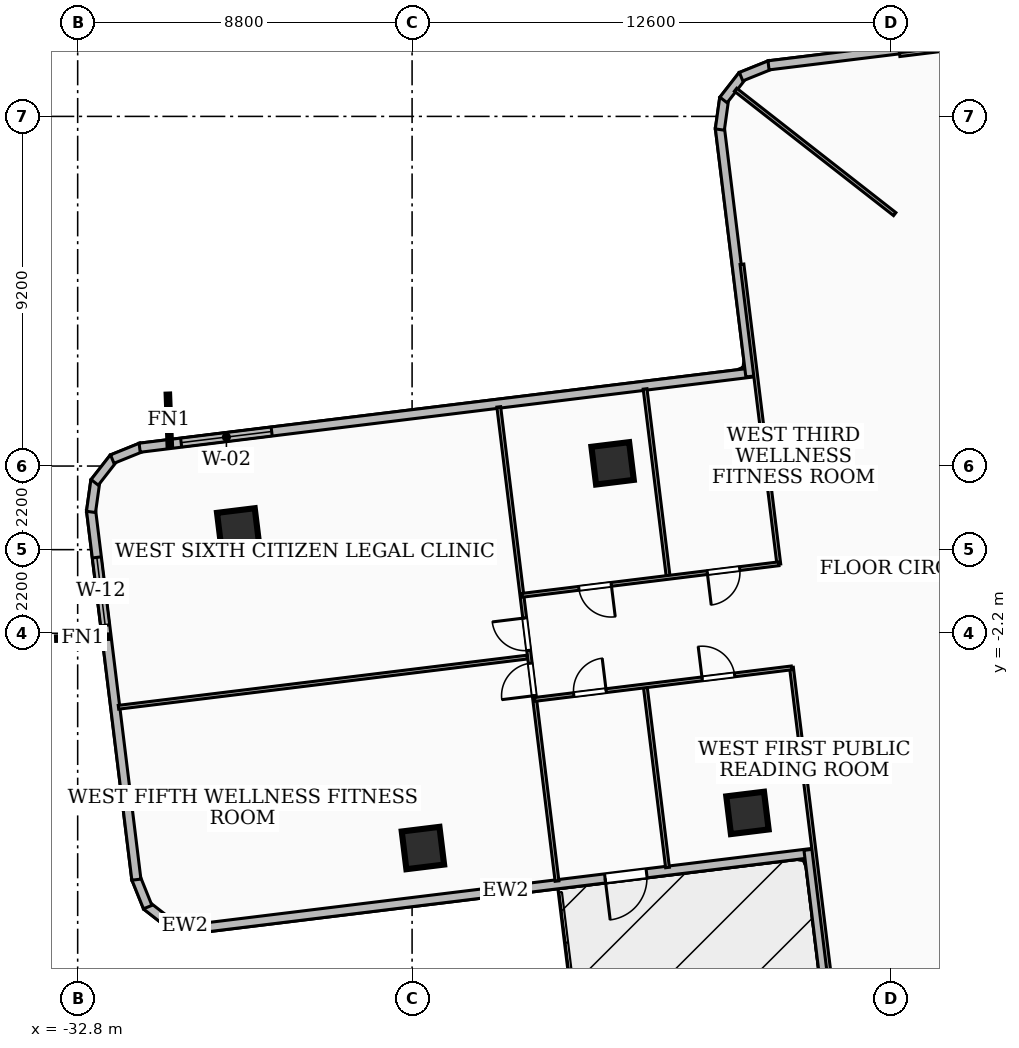
"""IFC4 building model, lengths in metres.
Left out: names, types, materials, properties, quantities, classifications, styles, units other than length and angle.
Written with IfcOpenShell. Run it as: python <this file> out.ifc"""

import sys

from ifc_helpers import new_model, si_unit, direction, frame, frame_2d, origin, origin_2d, place, context, subcontext, project, spatial, rectangle, extrude, element, fill, save


model = new_model("IFC4")
c1 = context("Model", 3, precision=1e-05, world=origin(), true_north=direction((0.0, 1.0)))
c2 = subcontext(c1, "Body", "Model", "MODEL_VIEW")
j1 = project(units=[si_unit("LENGTHUNIT", "METRE"), si_unit("PLANEANGLEUNIT", "RADIAN")], contexts=[c1])
p1 = place(None, origin())
s1 = spatial("IfcSite", under=j1, at=p1, CompositionType="ELEMENT")
p2 = place(p1, origin())
s2 = spatial("IfcBuilding", under=s1, at=p2, CompositionType="ELEMENT")
p3 = place(p2, frame((0.0, 0.0, 78.48)))
s3 = spatial("IfcBuildingStorey", under=s2, at=p3, CompositionType="ELEMENT", Elevation=78.48)
for number, where, z_axis, x_axis in (
    (1, (-18.724, 2.271, 0.0), (0.0, 0.0, 1.0), (0.993, 0.122, 0.0)),
    (2, (-15.175, -6.927, 0.0), (0.0, 0.0, 1.0), (0.993, 0.122, 0.0)),
    (3, (-28.576, 0.533, 0.0), (0.0, 0.0, 1.0), (0.993, 0.122, 0.0)),
    (4, (-23.715, -7.851, 0.0), (0.0, 0.0, 1.0), (0.993, 0.122, 0.0)),
):
    element("IfcColumn", number, at=place(p3, frame(where, z_axis=z_axis, x_axis=x_axis)), inside=s3, PredefinedType="COLUMN", context=c2, shape_type="SweptSolid", body=[
        extrude(rectangle(XDim=1.0, YDim=1.0, at=origin_2d()), origin(), (0.0, 0.0, 1.0), 3.6),
    ])
p4 = place(p3, frame((-13.462, -7.98, 0.0), z_axis=(0.0, 0.0, 1.0), x_axis=(-0.992550299081, -0.121835560463, 0.0)))
e5 = element("IfcWall", 5, at=p4, inside=s3, PredefinedType="SOLIDWALL", context=c2, shape_type="SweptSolid", body=[
    extrude(rectangle(XDim=16.275, YDim=0.24, at=frame_2d((8.138, 0.0))), origin(), (0.0, 0.0, 1.0), 2.644),
])
p5 = place(p4, frame((4.4, 0.0, 0.0)))
e6 = element("IfcOpeningElement", 6, at=p5, cuts=e5, PredefinedType="OPENING", context=c2, shape_type="SweptSolid", body=[
    extrude(rectangle(XDim=1.1, YDim=2.1, at=frame_2d((0.55, 1.05))), frame((0.0, 0.13, 0.0), z_axis=(0.0, -1.0, 0.0), x_axis=(1.0, 0.0, 0.0)), (0.0, 0.0, 1.0), 0.26),
])
p6 = place(p3, frame((-29.566, -9.963, 0.0), z_axis=(0.0, 0.0, 1.0), x_axis=(-0.990579937989, 0.136935701899, 0.0)))
e7 = element("IfcWall", 7, at=p6, inside=s3, PredefinedType="SOLIDWALL", context=c2, shape_type="SweptSolid", body=[
    extrude(rectangle(XDim=0.831, YDim=0.24, at=frame_2d((0.416, 0.0))), origin(), (0.0, 0.0, 1.0), 3.34),
])
p7 = place(p3, frame((-30.344, -9.867, 0.0), z_axis=(0.0, 0.0, 1.0), x_axis=(-0.788996702001, 0.614397431824, 0.0)))
e8 = element("IfcWall", 8, at=p7, inside=s3, PredefinedType="SOLIDWALL", context=c2, shape_type="SweptSolid", body=[
    extrude(rectangle(XDim=0.814, YDim=0.24, at=frame_2d((0.407, 0.0))), origin(), (0.0, 0.0, 1.0), 3.34),
])
p8 = place(p3, frame((-30.957, -9.405, 0.0), z_axis=(0.0, 0.0, 1.0), x_axis=(-0.373519459995, 0.927622343955, 0.0)))
e9 = element("IfcWall", 9, at=p8, inside=s3, PredefinedType="SOLIDWALL", context=c2, shape_type="SweptSolid", body=[
    extrude(rectangle(XDim=0.83, YDim=0.24, at=frame_2d((0.415, 0.0))), origin(), (0.0, 0.0, 1.0), 3.34),
])
p9 = place(p3, frame((-31.255, -8.683, 0.0), z_axis=(0.0, 0.0, 1.0), x_axis=(-0.12185728374, 0.992547632308, 0.0)))
e10 = element("IfcWall", 10, at=p9, inside=s3, PredefinedType="SOLIDWALL", context=c2, shape_type="SweptSolid", body=[
    extrude(rectangle(XDim=9.799, YDim=0.24, at=frame_2d((4.899, 0.0))), origin(), (0.0, 0.0, 1.0), 3.34),
])
p10 = place(p9, frame((6.743, 0.0, 0.85)))
e11 = element("IfcOpeningElement", 11, at=p10, cuts=e10, PredefinedType="OPENING", context=c2, shape_type="SweptSolid", body=[
    extrude(rectangle(XDim=1.8, YDim=1.6, at=frame_2d((0.9, 0.8))), frame((0.0, 0.13, 0.0), z_axis=(0.0, -1.0, 0.0), x_axis=(1.0, 0.0, 0.0)), (0.0, 0.0, 1.0), 0.26),
])
p11 = place(p3, frame((-32.449, 0.993, 0.0), z_axis=(0.0, 0.0, 1.0), x_axis=(0.138538220487, 0.990357087855, 0.0)))
e12 = element("IfcWall", 12, at=p11, inside=s3, PredefinedType="SOLIDWALL", context=c2, shape_type="SweptSolid", body=[
    extrude(rectangle(XDim=0.83, YDim=0.24, at=frame_2d((0.415, 0.0))), origin(), (0.0, 0.0, 1.0), 3.34),
])
p12 = place(p3, frame((-32.352, 1.77, 0.0), z_axis=(0.0, 0.0, 1.0), x_axis=(0.614397431824, 0.788996702001, 0.0)))
e13 = element("IfcWall", 13, at=p12, inside=s3, PredefinedType="SOLIDWALL", context=c2, shape_type="SweptSolid", body=[
    extrude(rectangle(XDim=0.814, YDim=0.24, at=frame_2d((0.407, 0.0))), origin(), (0.0, 0.0, 1.0), 3.34),
])
p13 = place(p3, frame((-31.89, 2.383, 0.0), z_axis=(0.0, 0.0, 1.0), x_axis=(0.927007742151, 0.375042192283, 0.0)))
e14 = element("IfcWall", 14, at=p13, inside=s3, PredefinedType="SOLIDWALL", context=c2, shape_type="SweptSolid", body=[
    extrude(rectangle(XDim=0.829, YDim=0.24, at=frame_2d((0.415, 0.0))), origin(), (0.0, 0.0, 1.0), 3.34),
])
p14 = place(p3, frame((-31.169, 2.682, 0.0), z_axis=(0.0, 0.0, 1.0), x_axis=(0.992548484973, 0.121850338438, 0.0)))
e15 = element("IfcWall", 15, at=p14, inside=s3, PredefinedType="SOLIDWALL", context=c2, shape_type="SweptSolid", body=[
    extrude(rectangle(XDim=16.275, YDim=0.24, at=frame_2d((8.138, 0.0))), origin(), (0.0, 0.0, 1.0), 3.34),
])
p15 = place(p14, frame((1.1, 0.0, 0.85)))
e16 = element("IfcOpeningElement", 16, at=p15, cuts=e15, PredefinedType="OPENING", context=c2, shape_type="SweptSolid", body=[
    extrude(rectangle(XDim=2.4, YDim=2.1, at=frame_2d((1.2, 1.05))), frame((0.0, 0.13, 0.0), z_axis=(0.0, -1.0, 0.0), x_axis=(1.0, 0.0, 0.0)), (0.0, 0.0, 1.0), 0.26),
])
p16 = place(p3, frame((-15.098, 4.558, 0.0), z_axis=(0.0, 0.0, 1.0), x_axis=(-0.121938646341, 0.992537639855, 0.0)))
e17 = element("IfcWall", 17, at=p16, inside=s3, PredefinedType="SOLIDWALL", context=c2, shape_type="SweptSolid", body=[
    extrude(rectangle(XDim=6.595, YDim=0.24, at=frame_2d((3.298, 0.0))), origin(), (0.0, 0.0, 1.0), 3.34),
])
p17 = place(p3, frame((-15.902, 11.054, 0.0), z_axis=(0.0, 0.0, 1.0), x_axis=(0.138376981782, 0.990379629694, 0.0)))
e18 = element("IfcWall", 18, at=p17, inside=s3, PredefinedType="SOLIDWALL", context=c2, shape_type="SweptSolid", body=[
    extrude(rectangle(XDim=0.831, YDim=0.24, at=frame_2d((0.416, 0.0))), origin(), (0.0, 0.0, 1.0), 3.34),
])
p18 = place(p3, frame((-15.805, 11.832, 0.0), z_axis=(0.0, 0.0, 1.0), x_axis=(0.614397431824, 0.788996702001, 0.0)))
e19 = element("IfcWall", 19, at=p18, inside=s3, PredefinedType="SOLIDWALL", context=c2, shape_type="SweptSolid", body=[
    extrude(rectangle(XDim=0.814, YDim=0.24, at=frame_2d((0.407, 0.0))), origin(), (0.0, 0.0, 1.0), 3.34),
])
p19 = place(p3, frame((-15.343, 12.445, 0.0), z_axis=(0.0, 0.0, 1.0), x_axis=(0.927724225254, 0.37326634174, 0.0)))
e20 = element("IfcWall", 20, at=p19, inside=s3, PredefinedType="SOLIDWALL", context=c2, shape_type="SweptSolid", body=[
    extrude(rectangle(XDim=0.83, YDim=0.24, at=frame_2d((0.415, 0.0))), origin(), (0.0, 0.0, 1.0), 3.34),
])
p20 = place(p3, frame((-14.621, 12.743, 0.0), z_axis=(0.0, 0.0, 1.0), x_axis=(0.992536263595, 0.121949848087, 0.0)))
e21 = element("IfcWall", 21, at=p20, inside=s3, PredefinedType="SOLIDWALL", context=c2, shape_type="SweptSolid", body=[
    extrude(rectangle(XDim=6.775, YDim=0.24, at=frame_2d((3.387, 0.0))), origin(), (0.0, 0.0, 1.0), 3.34),
])
p21 = place(p3, frame((-12.743, -14.621, 0.0), z_axis=(0.0, 0.0, 1.0), x_axis=(-0.121949848087, 0.992536263595, 0.0)))
e22 = element("IfcWall", 22, at=p21, inside=s3, PredefinedType="SOLIDWALL", context=c2, shape_type="SweptSolid", body=[
    extrude(rectangle(XDim=6.775, YDim=0.24, at=frame_2d((3.387, 0.0))), origin(), (0.0, 0.0, 1.0), 2.644),
])
p22 = place(p3, frame((-11.3, 8.829, 0.0), z_axis=(0.0, 0.0, 1.0), x_axis=(-0.788014623364, 0.61565652223, 0.0)))
e23 = element("IfcWall", 23, at=p22, inside=s3, PredefinedType="PARTITIONING", context=c2, shape_type="SweptSolid", body=[
    extrude(rectangle(XDim=5.315, YDim=0.1, at=frame_2d((2.657, 0.0))), origin(), (0.0, 0.0, 1.0), 3.34),
])
p23 = place(p3, frame((-8.11, -10.38, 0.0), z_axis=(0.0, 0.0, 1.0), x_axis=(-0.615665236773, -0.788007814828, 0.0)))
e24 = element("IfcWall", 24, at=p23, inside=s3, PredefinedType="PARTITIONING", context=c2, shape_type="SweptSolid", body=[
    extrude(rectangle(XDim=6.482, YDim=0.1, at=frame_2d((3.241, 0.0))), origin(), (0.0, 0.0, 1.0), 2.644),
])
for number, where, z_axis, x_axis in (
    (25, (-3.101, 14.017, 0.0), (0.0, 0.0, 1.0), (-0.993, -0.122, 0.0)),
    (26, (-14.017, -3.101, 0.0), (0.0, 0.0, 1.0), (0.122, -0.993, 0.0)),
):
    element("IfcWall", number, at=place(p3, frame(where, z_axis=z_axis, x_axis=x_axis)), inside=s3, PredefinedType="PARTITIONING", context=c2, shape_type="SweptSolid", body=[
        extrude(rectangle(XDim=8.13, YDim=0.1, at=frame_2d((4.065, 0.0))), origin(), (0.0, 0.0, 1.0), 2.486),
    ])
p24 = place(p3, frame((-15.32, 7.509, 0.0), z_axis=(0.0, 0.0, 1.0), x_axis=(0.122001160868, -0.992529957607, 0.0)))
e27 = element("IfcWall", 27, at=p24, inside=s3, PredefinedType="PARTITIONING", context=c2, shape_type="SweptSolid", body=[
    extrude(rectangle(XDim=7.95, YDim=0.1, at=frame_2d((3.975, 0.0))), origin(), (0.0, 0.0, 1.0), 2.486),
])
p25 = place(p3, frame((-17.864, -3.604, 0.0), z_axis=(0.0, 0.0, 1.0), x_axis=(0.121997782455, -0.992530372873, 0.0)))
e28 = element("IfcWall", 28, at=p25, inside=s3, PredefinedType="PARTITIONING", context=c2, shape_type="SweptSolid", body=[
    extrude(rectangle(XDim=4.795, YDim=0.1, at=frame_2d((2.397, 0.0))), origin(), (0.0, 0.0, 1.0), 2.486),
])
p26 = place(p3, frame((-17.869, 4.229, 0.0), z_axis=(0.0, 0.0, 1.0), x_axis=(0.121993075508, -0.992530951421, 0.0)))
e29 = element("IfcWall", 29, at=p26, inside=s3, PredefinedType="PARTITIONING", context=c2, shape_type="SweptSolid", body=[
    extrude(rectangle(XDim=4.975, YDim=0.1, at=frame_2d((2.488, 0.0))), origin(), (0.0, 0.0, 1.0), 2.486),
])
p27 = place(p3, frame((-20.775, -3.941, 0.0), z_axis=(0.0, 0.0, 1.0), x_axis=(0.992549540745, 0.121841738199, 0.0)))
e30 = element("IfcWall", 30, at=p27, inside=s3, PredefinedType="PARTITIONING", context=c2, shape_type="SweptSolid", body=[
    extrude(rectangle(XDim=6.811, YDim=0.1, at=frame_2d((3.405, 0.0))), origin(), (0.0, 0.0, 1.0), 3.34),
])
p28 = place(p27, frame((4.441, 0.0, 0.0)))
e31 = element("IfcOpeningElement", 31, at=p28, cuts=e30, PredefinedType="OPENING", context=c2, shape_type="SweptSolid", body=[
    extrude(rectangle(XDim=0.86, YDim=2.04, at=frame_2d((0.43, 1.02))), frame((0.0, 0.06, 0.0), z_axis=(0.0, -1.0, 0.0), x_axis=(1.0, 0.0, 0.0)), (0.0, 0.0, 1.0), 0.12),
])
p29 = place(p27, frame((1.036, 0.0, 0.0)))
e32 = element("IfcOpeningElement", 32, at=p29, cuts=e30, PredefinedType="OPENING", context=c2, shape_type="SweptSolid", body=[
    extrude(rectangle(XDim=0.86, YDim=2.04, at=frame_2d((0.43, 1.02))), frame((0.0, 0.06, 0.0), z_axis=(0.0, -1.0, 0.0), x_axis=(1.0, 0.0, 0.0)), (0.0, 0.0, 1.0), 0.12),
])
p30 = place(p3, frame((-14.352, -0.372, 0.0), z_axis=(0.0, 0.0, 1.0), x_axis=(-0.992547411675, -0.121859080812, 0.0)))
e33 = element("IfcWall", 33, at=p30, inside=s3, PredefinedType="PARTITIONING", context=c2, shape_type="SweptSolid", body=[
    extrude(rectangle(XDim=6.81, YDim=0.1, at=frame_2d((3.405, 0.0))), origin(), (0.0, 0.0, 1.0), 3.34),
])
p31 = place(p30, frame((1.035, 0.0, 0.0)))
e34 = element("IfcOpeningElement", 34, at=p31, cuts=e33, PredefinedType="OPENING", context=c2, shape_type="SweptSolid", body=[
    extrude(rectangle(XDim=0.86, YDim=2.04, at=frame_2d((0.43, 1.02))), frame((0.0, 0.06, 0.0), z_axis=(0.0, -1.0, 0.0), x_axis=(1.0, 0.0, 0.0)), (0.0, 0.0, 1.0), 0.12),
])
p32 = place(p30, frame((4.44, 0.0, 0.0)))
e35 = element("IfcOpeningElement", 35, at=p32, cuts=e33, PredefinedType="OPENING", context=c2, shape_type="SweptSolid", body=[
    extrude(rectangle(XDim=0.86, YDim=2.04, at=frame_2d((0.43, 1.02))), frame((0.0, 0.06, 0.0), z_axis=(0.0, -1.0, 0.0), x_axis=(1.0, 0.0, 0.0)), (0.0, 0.0, 1.0), 0.12),
])
p33 = place(p3, frame((-20.972, -2.827, 0.0), z_axis=(0.0, 0.0, 1.0), x_axis=(-0.992550340633, -0.121835221953, 0.0)))
e36 = element("IfcWall", 36, at=p33, inside=s3, PredefinedType="PARTITIONING", context=c2, shape_type="SweptSolid", body=[
    extrude(rectangle(XDim=10.835, YDim=0.1, at=frame_2d((5.417, 0.0))), origin(), (0.0, 0.0, 1.0), 2.793),
])
p34 = place(p3, frame((-20.187, -8.72, 0.0), z_axis=(0.0, 0.0, 1.0), x_axis=(-0.121878209661, 0.992545062962, 0.0)))
e37 = element("IfcWall", 37, at=p34, inside=s3, PredefinedType="PARTITIONING", context=c2, shape_type="SweptSolid", body=[
    extrude(rectangle(XDim=12.57, YDim=0.1, at=frame_2d((6.285, 0.0))), origin(), (0.0, 0.0, 1.0), 2.486),
])
p35 = place(p34, frame((6.115, 0.0, 0.0)))
e38 = element("IfcOpeningElement", 38, at=p35, cuts=e37, PredefinedType="OPENING", context=c2, shape_type="SweptSolid", body=[
    extrude(rectangle(XDim=0.86, YDim=2.04, at=frame_2d((0.43, 1.02))), frame((0.0, 0.06, 0.0), z_axis=(0.0, -1.0, 0.0), x_axis=(1.0, 0.0, 0.0)), (0.0, 0.0, 1.0), 0.12),
])
p36 = place(p34, frame((4.915, 0.0, 0.0)))
e39 = element("IfcOpeningElement", 39, at=p36, cuts=e37, PredefinedType="OPENING", context=c2, shape_type="SweptSolid", body=[
    extrude(rectangle(XDim=0.86, YDim=2.04, at=frame_2d((0.43, 1.02))), frame((0.0, 0.06, 0.0), z_axis=(0.0, -1.0, 0.0), x_axis=(1.0, 0.0, 0.0)), (0.0, 0.0, 1.0), 0.12),
])
p37 = place(p5, origin())
e40 = element("IfcDoor", 40, at=p37, inside=s3, OperationType="SINGLE_SWING_RIGHT", PredefinedType="DOOR", context=c2, shape_type="SweptSolid", body=[
    extrude(rectangle(XDim=1.1, YDim=2.1, at=frame_2d((0.55, 1.05))), frame((0.0, 0.025, 0.0), z_axis=(0.0, -1.0, 0.0), x_axis=(1.0, 0.0, 0.0)), (0.0, 0.0, 1.0), 0.05),
])
fill(e6, e40)
p38 = place(p10, origin())
e41 = element("IfcWindow", 41, at=p38, inside=s3, PartitioningType="SINGLE_PANEL", PredefinedType="WINDOW", context=c2, shape_type="SweptSolid", body=[
    extrude(rectangle(XDim=1.8, YDim=1.6, at=frame_2d((0.9, 0.8))), frame((0.0, 0.03, 0.0), z_axis=(0.0, -1.0, 0.0), x_axis=(1.0, 0.0, 0.0)), (0.0, 0.0, 1.0), 0.06),
])
fill(e11, e41)
p39 = place(p15, origin())
e42 = element("IfcWindow", 42, at=p39, inside=s3, PartitioningType="SINGLE_PANEL", PredefinedType="WINDOW", context=c2, shape_type="SweptSolid", body=[
    extrude(rectangle(XDim=2.4, YDim=2.1, at=frame_2d((1.2, 1.05))), frame((0.0, 0.03, 0.0), z_axis=(0.0, -1.0, 0.0), x_axis=(1.0, 0.0, 0.0)), (0.0, 0.0, 1.0), 0.06),
])
fill(e16, e42)
p40 = place(p28, origin())
e43 = element("IfcDoor", 43, at=p40, inside=s3, OperationType="SINGLE_SWING_LEFT", PredefinedType="DOOR", context=c2, shape_type="SweptSolid", body=[
    extrude(rectangle(XDim=0.86, YDim=2.04, at=frame_2d((0.43, 1.02))), frame((0.0, 0.025, 0.0), z_axis=(0.0, -1.0, 0.0), x_axis=(1.0, 0.0, 0.0)), (0.0, 0.0, 1.0), 0.05),
])
fill(e31, e43)
p41 = place(p29, origin())
e44 = element("IfcDoor", 44, at=p41, inside=s3, OperationType="SINGLE_SWING_RIGHT", PredefinedType="DOOR", context=c2, shape_type="SweptSolid", body=[
    extrude(rectangle(XDim=0.86, YDim=2.04, at=frame_2d((0.43, 1.02))), frame((0.0, 0.025, 0.0), z_axis=(0.0, -1.0, 0.0), x_axis=(1.0, 0.0, 0.0)), (0.0, 0.0, 1.0), 0.05),
])
fill(e32, e44)
p42 = place(p31, origin())
e45 = element("IfcDoor", 45, at=p42, inside=s3, OperationType="SINGLE_SWING_RIGHT", PredefinedType="DOOR", context=c2, shape_type="SweptSolid", body=[
    extrude(rectangle(XDim=0.86, YDim=2.04, at=frame_2d((0.43, 1.02))), frame((0.0, 0.025, 0.0), z_axis=(0.0, -1.0, 0.0), x_axis=(1.0, 0.0, 0.0)), (0.0, 0.0, 1.0), 0.05),
])
fill(e34, e45)
p43 = place(p32, origin())
e46 = element("IfcDoor", 46, at=p43, inside=s3, OperationType="SINGLE_SWING_LEFT", PredefinedType="DOOR", context=c2, shape_type="SweptSolid", body=[
    extrude(rectangle(XDim=0.86, YDim=2.04, at=frame_2d((0.43, 1.02))), frame((0.0, 0.025, 0.0), z_axis=(0.0, -1.0, 0.0), x_axis=(1.0, 0.0, 0.0)), (0.0, 0.0, 1.0), 0.05),
])
fill(e35, e46)
p44 = place(p35, origin())
e47 = element("IfcDoor", 47, at=p44, inside=s3, OperationType="SINGLE_SWING_RIGHT", PredefinedType="DOOR", context=c2, shape_type="SweptSolid", body=[
    extrude(rectangle(XDim=0.86, YDim=2.04, at=frame_2d((0.43, 1.02))), frame((0.0, 0.025, 0.0), z_axis=(0.0, -1.0, 0.0), x_axis=(1.0, 0.0, 0.0)), (0.0, 0.0, 1.0), 0.05),
])
fill(e38, e47)
p45 = place(p36, origin())
e48 = element("IfcDoor", 48, at=p45, inside=s3, OperationType="SINGLE_SWING_LEFT", PredefinedType="DOOR", context=c2, shape_type="SweptSolid", body=[
    extrude(rectangle(XDim=0.86, YDim=2.04, at=frame_2d((0.43, 1.02))), frame((0.0, 0.025, 0.0), z_axis=(0.0, -1.0, 0.0), x_axis=(1.0, 0.0, 0.0)), (0.0, 0.0, 1.0), 0.05),
])
fill(e39, e48)
save(model, sys.argv[1])
